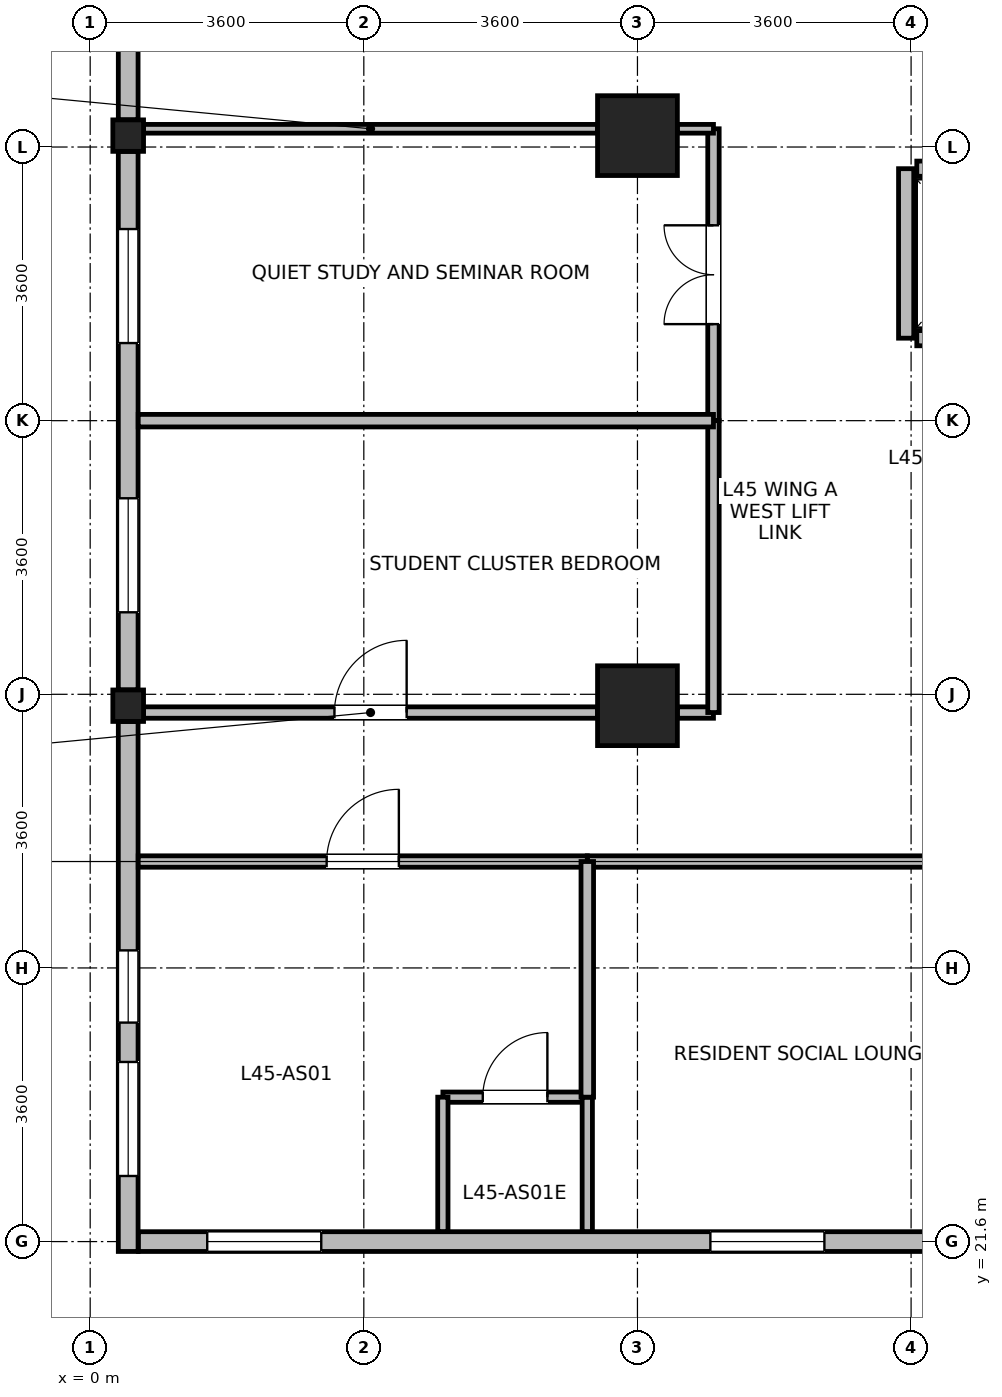
"""IFC4 building model, lengths in metres.
Left out: names, types, materials, properties, quantities, classifications, styles, units other than length and angle.
Written with IfcOpenShell. Run it as: python <this file> out.ifc"""

import sys

from ifc_helpers import new_model, si_unit, direction, frame, frame_2d, origin, origin_2d, place, context, subcontext, project, spatial, rectangle, i_section, extrude, source, transform, mapped, element, fill, save


model = new_model("IFC4")
c1 = context("Model", 3, precision=1e-05, world=origin(), true_north=direction((0.0, 1.0)))
c2 = subcontext(c1, "Body", "Model", "MODEL_VIEW")
j1 = project(units=[si_unit("LENGTHUNIT", "METRE"), si_unit("PLANEANGLEUNIT", "RADIAN")], contexts=[c1])
p1 = place(None, origin())
s1 = spatial("IfcSite", under=j1, at=p1, CompositionType="ELEMENT")
p2 = place(p1, origin())
s2 = spatial("IfcBuilding", under=s1, at=p2, CompositionType="ELEMENT")
p3 = place(p2, frame((0.0, 0.0, 177.2)))
s3 = spatial("IfcBuildingStorey", under=s2, at=p3, CompositionType="ELEMENT", Elevation=177.2)
m1 = source(origin(), c2, "Body", "SweptSolid", [
    extrude(rectangle(XDim=1.05, YDim=1.05, at=origin_2d()), origin(), (0.0, 0.0, 1.0), 3.7),
])
for number, where, z_axis, x_axis in (
    (1, (7.2, 28.65, 0.0), (0.0, 0.0, 1.0), (1.0, 0.0, 0.0)),
    (2, (7.2, 36.15, 0.0), (0.0, 0.0, 1.0), (1.0, 0.0, 0.0)),
):
    element("IfcColumn", number, at=place(p3, frame(where, z_axis=z_axis, x_axis=x_axis)), inside=s3, PredefinedType="COLUMN", context=c2, shape_type="MappedRepresentation", body=[
        mapped(m1, transform((0.0, 0.0, 0.0), x_axis=(1.0, 0.0, 0.0), y_axis=(0.0, 1.0, 0.0), z_axis=(0.0, 0.0, 1.0), scale=1.0)),
    ])
m2 = source(origin(), c2, "Body", "SweptSolid", [
    extrude(i_section(OverallWidth=0.404, OverallDepth=0.414, WebThickness=0.021, FlangeThickness=0.028, FilletRadius=0.015, at=origin_2d()), origin(), (0.0, 0.0, 1.0), 3.7),
])
for number, where, z_axis, x_axis in (
    (3, (0.5, 28.65, 0.0), (0.0, 0.0, 1.0), (1.0, 0.0, 0.0)),
    (4, (0.5, 36.15, 0.0), (0.0, 0.0, 1.0), (1.0, 0.0, 0.0)),
):
    element("IfcColumn", number, at=place(p3, frame(where, z_axis=z_axis, x_axis=x_axis)), inside=s3, PredefinedType="COLUMN", context=c2, shape_type="MappedRepresentation", body=[
        mapped(m2, transform((0.0, 0.0, 0.0), x_axis=(1.0, 0.0, 0.0), y_axis=(0.0, 1.0, 0.0), z_axis=(0.0, 0.0, 1.0), scale=1.0)),
    ])
p4 = place(p3, frame((0.5, 36.358, 0.0), z_axis=(0.0, 0.0, 1.0), x_axis=(0.0, 1.0, 0.0)))
e5 = element("IfcWall", 5, at=p4, inside=s3, PredefinedType="STANDARD", context=c2, shape_type="SweptSolid", body=[
    extrude(rectangle(XDim=3.372, YDim=0.26, at=frame_2d((1.686, 0.0))), origin(), (0.0, 0.0, 1.0), 3.44),
])
p5 = place(p4, frame((0.936, 0.0, 0.85)))
e6 = element("IfcOpeningElement", 6, at=p5, cuts=e5, PredefinedType="OPENING", context=c2, shape_type="SweptSolid", body=[
    extrude(rectangle(XDim=1.5, YDim=1.85, at=frame_2d((0.75, 0.925))), frame((0.0, 0.14, 0.0), z_axis=(0.0, -1.0, 0.0), x_axis=(1.0, 0.0, 0.0)), (0.0, 0.0, 1.0), 0.28),
])
p6 = place(p3, frame((0.5, 28.858, 0.0), z_axis=(0.0, 0.0, 1.0), x_axis=(0.0, 1.0, 0.0)))
e7 = element("IfcWall", 7, at=p6, inside=s3, PredefinedType="STANDARD", context=c2, shape_type="SweptSolid", body=[
    extrude(rectangle(XDim=7.084, YDim=0.26, at=frame_2d((3.542, 0.0))), origin(), (0.0, 0.0, 1.0), 2.99),
])
p7 = place(p6, frame((1.021, 0.0, 0.85)))
e8 = element("IfcOpeningElement", 8, at=p7, cuts=e7, PredefinedType="OPENING", context=c2, shape_type="SweptSolid", body=[
    extrude(rectangle(XDim=1.5, YDim=1.85, at=frame_2d((0.75, 0.925))), frame((0.0, 0.14, 0.0), z_axis=(0.0, -1.0, 0.0), x_axis=(1.0, 0.0, 0.0)), (0.0, 0.0, 1.0), 0.28),
])
p8 = place(p6, frame((4.563, 0.0, 0.85)))
e9 = element("IfcOpeningElement", 9, at=p8, cuts=e7, PredefinedType="OPENING", context=c2, shape_type="SweptSolid", body=[
    extrude(rectangle(XDim=1.5, YDim=1.85, at=frame_2d((0.75, 0.925))), frame((0.0, 0.14, 0.0), z_axis=(0.0, -1.0, 0.0), x_axis=(1.0, 0.0, 0.0)), (0.0, 0.0, 1.0), 0.28),
])
p9 = place(p3, frame((0.5, 21.47, 0.0), z_axis=(0.0, 0.0, 1.0), x_axis=(0.0, 1.0, 0.0)))
e10 = element("IfcWall", 10, at=p9, inside=s3, PredefinedType="STANDARD", context=c2, shape_type="SweptSolid", body=[
    extrude(rectangle(XDim=6.972, YDim=0.26, at=frame_2d((3.486, 0.0))), origin(), (0.0, 0.0, 1.0), 3.44),
])
p10 = place(p9, frame((0.993, 0.0, 0.85)))
e11 = element("IfcOpeningElement", 11, at=p10, cuts=e10, PredefinedType="OPENING", context=c2, shape_type="SweptSolid", body=[
    extrude(rectangle(XDim=1.5, YDim=1.85, at=frame_2d((0.75, 0.925))), frame((0.0, 0.14, 0.0), z_axis=(0.0, -1.0, 0.0), x_axis=(1.0, 0.0, 0.0)), (0.0, 0.0, 1.0), 0.28),
])
p11 = place(p9, frame((3.011, 0.0, 0.85)))
e12 = element("IfcOpeningElement", 12, at=p11, cuts=e10, PredefinedType="OPENING", context=c2, shape_type="SweptSolid", body=[
    extrude(rectangle(XDim=0.95, YDim=1.75, at=frame_2d((0.475, 0.875))), frame((0.0, 0.14, 0.0), z_axis=(0.0, -1.0, 0.0), x_axis=(1.0, 0.0, 0.0)), (0.0, 0.0, 1.0), 0.28),
])
p12 = place(p3, frame((13.874, 21.6, 0.0), z_axis=(0.0, 0.0, 1.0), x_axis=(-1.0, 0.0, 0.0)))
e13 = element("IfcWall", 13, at=p12, inside=s3, PredefinedType="STANDARD", context=c2, shape_type="SweptSolid", body=[
    extrude(rectangle(XDim=13.239, YDim=0.26, at=frame_2d((6.62, 0.0))), origin(), (0.0, 0.0, 1.0), 3.44),
])
p13 = place(p12, frame((0.905, 0.0, 0.85)))
e14 = element("IfcOpeningElement", 14, at=p13, cuts=e13, PredefinedType="OPENING", context=c2, shape_type="SweptSolid", body=[
    extrude(rectangle(XDim=1.5, YDim=1.85, at=frame_2d((0.75, 0.925))), frame((0.0, 0.14, 0.0), z_axis=(0.0, -1.0, 0.0), x_axis=(1.0, 0.0, 0.0)), (0.0, 0.0, 1.0), 0.28),
])
p14 = place(p12, frame((4.215, 0.0, 0.85)))
e15 = element("IfcOpeningElement", 15, at=p14, cuts=e13, PredefinedType="OPENING", context=c2, shape_type="SweptSolid", body=[
    extrude(rectangle(XDim=1.5, YDim=1.85, at=frame_2d((0.75, 0.925))), frame((0.0, 0.14, 0.0), z_axis=(0.0, -1.0, 0.0), x_axis=(1.0, 0.0, 0.0)), (0.0, 0.0, 1.0), 0.28),
])
p15 = place(p12, frame((10.834, 0.0, 0.85)))
e16 = element("IfcOpeningElement", 16, at=p15, cuts=e13, PredefinedType="OPENING", context=c2, shape_type="SweptSolid", body=[
    extrude(rectangle(XDim=1.5, YDim=1.85, at=frame_2d((0.75, 0.925))), frame((0.0, 0.14, 0.0), z_axis=(0.0, -1.0, 0.0), x_axis=(1.0, 0.0, 0.0)), (0.0, 0.0, 1.0), 0.28),
])
p16 = place(p3, frame((10.875, 33.485, 0.0), z_axis=(0.0, 0.0, 1.0), x_axis=(1.0, 0.0, 0.0)))
e17 = element("IfcWall", 17, at=p16, inside=s3, PredefinedType="PARTITIONING", context=c2, shape_type="SweptSolid", body=[
    extrude(rectangle(XDim=1.65, YDim=0.2, at=frame_2d((0.825, 0.0))), origin(), (0.0, 0.0, 1.0), 3.44),
])
p17 = place(p16, frame((0.275, 0.0, 0.0)))
e18 = element("IfcOpeningElement", 18, at=p17, cuts=e17, PredefinedType="OPENING", context=c2, shape_type="SweptSolid", body=[
    extrude(rectangle(XDim=1.1, YDim=2.12, at=frame_2d((0.55, 1.06))), frame((0.0, 0.11, 0.0), z_axis=(0.0, -1.0, 0.0), x_axis=(1.0, 0.0, 0.0)), (0.0, 0.0, 1.0), 0.22),
])
p18 = place(p3, frame((10.875, 35.715, 0.0), z_axis=(0.0, 0.0, 1.0), x_axis=(1.0, 0.0, 0.0)))
e19 = element("IfcWall", 19, at=p18, inside=s3, PredefinedType="PARTITIONING", context=c2, shape_type="SweptSolid", body=[
    extrude(rectangle(XDim=1.65, YDim=0.2, at=frame_2d((0.825, 0.0))), origin(), (0.0, 0.0, 1.0), 3.44),
])
p19 = place(p3, frame((10.735, 33.485, 0.0), z_axis=(0.0, 0.0, 1.0), x_axis=(0.0, 1.0, 0.0)))
e20 = element("IfcWall", 20, at=p19, inside=s3, PredefinedType="PARTITIONING", context=c2, shape_type="SweptSolid", body=[
    extrude(rectangle(XDim=2.23, YDim=0.2, at=frame_2d((1.115, 0.0))), origin(), (0.0, 0.0, 1.0), 3.44),
])
p20 = place(p3, frame((4.64, 23.5, 0.0), z_axis=(0.0, 0.0, 1.0), x_axis=(1.0, 0.0, 0.0)))
e21 = element("IfcWall", 21, at=p20, inside=s3, PredefinedType="PARTITIONING", context=c2, shape_type="SweptSolid", body=[
    extrude(rectangle(XDim=1.9, YDim=0.135, at=frame_2d((0.95, 0.0))), origin(), (0.0, 0.0, 1.0), 3.44),
])
p21 = place(p20, frame((0.525, 0.0, 0.0)))
e22 = element("IfcOpeningElement", 22, at=p21, cuts=e21, PredefinedType="OPENING", context=c2, shape_type="SweptSolid", body=[
    extrude(rectangle(XDim=0.85, YDim=2.04, at=frame_2d((0.425, 1.02))), frame((0.0, 0.078, 0.0), z_axis=(0.0, -1.0, 0.0), x_axis=(1.0, 0.0, 0.0)), (0.0, 0.0, 1.0), 0.155),
])
for number, where, z_axis, x_axis in (
    (23, (4.64, 21.732, 0.0), (0.0, 0.0, 1.0), (0.0, 1.0, 0.0)),
    (24, (6.54, 21.732, 0.0), (0.0, 0.0, 1.0), (0.0, 1.0, 0.0)),
):
    element("IfcWall", number, at=place(p3, frame(where, z_axis=z_axis, x_axis=x_axis)), inside=s3, PredefinedType="PARTITIONING", context=c2, shape_type="SweptSolid", body=[
        extrude(rectangle(XDim=1.768, YDim=0.135, at=frame_2d((0.884, 0.0))), origin(), (0.0, 0.0, 1.0), 3.44),
    ])
p22 = place(p3, frame((6.54, 26.6, 0.0), z_axis=(0.0, 0.0, 1.0), x_axis=(1.0, 0.0, 0.0)))
e25 = element("IfcWall", 25, at=p22, inside=s3, PredefinedType="PARTITIONING", context=c2, shape_type="SweptSolid", body=[
    extrude(rectangle(XDim=10.32, YDim=0.15, at=frame_2d((5.16, 0.0))), origin(), (0.0, 0.0, 1.0), 3.44),
])
p23 = place(p22, frame((4.51, 0.0, 0.0)))
e26 = element("IfcOpeningElement", 26, at=p23, cuts=e25, PredefinedType="OPENING", context=c2, shape_type="SweptSolid", body=[
    extrude(rectangle(XDim=1.3, YDim=2.12, at=frame_2d((0.65, 1.06))), frame((0.0, 0.085, 0.0), z_axis=(0.0, -1.0, 0.0), x_axis=(1.0, 0.0, 0.0)), (0.0, 0.0, 1.0), 0.17),
])
p24 = place(p3, frame((0.702, 28.56, 0.0), z_axis=(0.0, 0.0, 1.0), x_axis=(1.0, 0.0, 0.0)))
e27 = element("IfcWall", 27, at=p24, inside=s3, PredefinedType="PARTITIONING", context=c2, shape_type="SweptSolid", body=[
    extrude(rectangle(XDim=5.973, YDim=0.15, at=frame_2d((2.987, 0.0))), origin(), (0.0, 0.0, 1.0), 2.84),
])
p25 = place(p24, frame((2.511, 0.0, 0.0)))
e28 = element("IfcOpeningElement", 28, at=p25, cuts=e27, PredefinedType="OPENING", context=c2, shape_type="SweptSolid", body=[
    extrude(rectangle(XDim=0.95, YDim=2.1, at=frame_2d((0.475, 1.05))), frame((0.0, 0.085, 0.0), z_axis=(0.0, -1.0, 0.0), x_axis=(1.0, 0.0, 0.0)), (0.0, 0.0, 1.0), 0.17),
])
p26 = place(p3, frame((7.725, 28.56, 0.0), z_axis=(0.0, 0.0, 1.0), x_axis=(1.0, 0.0, 0.0)))
e29 = element("IfcWall", 29, at=p26, inside=s3, PredefinedType="PARTITIONING", context=c2, shape_type="SweptSolid", body=[
    extrude(rectangle(XDim=0.475, YDim=0.15, at=frame_2d((0.237, 0.0))), origin(), (0.0, 0.0, 1.0), 2.84),
])
p27 = place(p3, frame((0.632, 26.6, 0.0), z_axis=(0.0, 0.0, 1.0), x_axis=(1.0, 0.0, 0.0)))
e30 = element("IfcWall", 30, at=p27, inside=s3, PredefinedType="PARTITIONING", context=c2, shape_type="SweptSolid", body=[
    extrude(rectangle(XDim=5.908, YDim=0.15, at=frame_2d((2.954, 0.0))), origin(), (0.0, 0.0, 1.0), 3.44),
])
p28 = place(p27, frame((2.479, 0.0, 0.0)))
e31 = element("IfcOpeningElement", 31, at=p28, cuts=e30, PredefinedType="OPENING", context=c2, shape_type="SweptSolid", body=[
    extrude(rectangle(XDim=0.95, YDim=2.1, at=frame_2d((0.475, 1.05))), frame((0.0, 0.085, 0.0), z_axis=(0.0, -1.0, 0.0), x_axis=(1.0, 0.0, 0.0)), (0.0, 0.0, 1.0), 0.17),
])
p29 = place(p3, frame((8.2, 32.4, 0.0), z_axis=(0.0, 0.0, 1.0), x_axis=(0.0, 1.0, 0.0)))
e32 = element("IfcWall", 32, at=p29, inside=s3, PredefinedType="PARTITIONING", context=c2, shape_type="SweptSolid", body=[
    extrude(rectangle(XDim=3.84, YDim=0.15, at=frame_2d((1.92, 0.0))), origin(), (0.0, 0.0, 1.0), 3.44),
])
p30 = place(p29, frame((1.27, 0.0, 0.0)))
e33 = element("IfcOpeningElement", 33, at=p30, cuts=e32, PredefinedType="OPENING", context=c2, shape_type="SweptSolid", body=[
    extrude(rectangle(XDim=1.3, YDim=2.12, at=frame_2d((0.65, 1.06))), frame((0.0, 0.085, 0.0), z_axis=(0.0, -1.0, 0.0), x_axis=(1.0, 0.0, 0.0)), (0.0, 0.0, 1.0), 0.17),
])
p31 = place(p3, frame((8.2, 28.56, 0.0), z_axis=(0.0, 0.0, 1.0), x_axis=(0.0, 1.0, 0.0)))
e34 = element("IfcWall", 34, at=p31, inside=s3, PredefinedType="PARTITIONING", context=c2, shape_type="SweptSolid", body=[
    extrude(rectangle(XDim=3.84, YDim=0.15, at=frame_2d((1.92, 0.0))), origin(), (0.0, 0.0, 1.0), 3.44),
])
p32 = place(p3, frame((0.632, 32.4, 0.0), z_axis=(0.0, 0.0, 1.0), x_axis=(1.0, 0.0, 0.0)))
e35 = element("IfcWall", 35, at=p32, inside=s3, PredefinedType="PARTITIONING", context=c2, shape_type="SweptSolid", body=[
    extrude(rectangle(XDim=7.568, YDim=0.165, at=frame_2d((3.784, 0.0))), origin(), (0.0, 0.0, 1.0), 3.44),
])
p33 = place(p3, frame((0.702, 36.24, 0.0), z_axis=(0.0, 0.0, 1.0), x_axis=(1.0, 0.0, 0.0)))
e36 = element("IfcWall", 36, at=p33, inside=s3, PredefinedType="PARTITIONING", context=c2, shape_type="SweptSolid", body=[
    extrude(rectangle(XDim=5.973, YDim=0.115, at=frame_2d((2.987, 0.0))), origin(), (0.0, 0.0, 1.0), 2.84),
])
p34 = place(p3, frame((7.725, 36.24, 0.0), z_axis=(0.0, 0.0, 1.0), x_axis=(1.0, 0.0, 0.0)))
e37 = element("IfcWall", 37, at=p34, inside=s3, PredefinedType="PARTITIONING", context=c2, shape_type="SweptSolid", body=[
    extrude(rectangle(XDim=0.475, YDim=0.115, at=frame_2d((0.237, 0.0))), origin(), (0.0, 0.0, 1.0), 2.84),
])
p35 = place(p3, frame((6.54, 23.5, 0.0), z_axis=(0.0, 0.0, 1.0), x_axis=(0.0, 1.0, 0.0)))
e38 = element("IfcWall", 38, at=p35, inside=s3, PredefinedType="PARTITIONING", context=c2, shape_type="SweptSolid", body=[
    extrude(rectangle(XDim=3.1, YDim=0.165, at=frame_2d((1.55, 0.0))), origin(), (0.0, 0.0, 1.0), 3.44),
])
p36 = place(p7, origin())
e39 = element("IfcWindow", 39, at=p36, inside=s3, PartitioningType="SINGLE_PANEL", PredefinedType="WINDOW", context=c2, shape_type="SweptSolid", body=[
    extrude(rectangle(XDim=1.5, YDim=1.85, at=frame_2d((0.75, 0.925))), frame((0.0, 0.03, 0.0), z_axis=(0.0, -1.0, 0.0), x_axis=(1.0, 0.0, 0.0)), (0.0, 0.0, 1.0), 0.06),
])
fill(e8, e39)
p37 = place(p8, origin())
e40 = element("IfcWindow", 40, at=p37, inside=s3, PartitioningType="SINGLE_PANEL", PredefinedType="WINDOW", context=c2, shape_type="SweptSolid", body=[
    extrude(rectangle(XDim=1.5, YDim=1.85, at=frame_2d((0.75, 0.925))), frame((0.0, 0.03, 0.0), z_axis=(0.0, -1.0, 0.0), x_axis=(1.0, 0.0, 0.0)), (0.0, 0.0, 1.0), 0.06),
])
fill(e9, e40)
p38 = place(p10, origin())
e41 = element("IfcWindow", 41, at=p38, inside=s3, PartitioningType="SINGLE_PANEL", PredefinedType="WINDOW", context=c2, shape_type="SweptSolid", body=[
    extrude(rectangle(XDim=1.5, YDim=1.85, at=frame_2d((0.75, 0.925))), frame((0.0, 0.03, 0.0), z_axis=(0.0, -1.0, 0.0), x_axis=(1.0, 0.0, 0.0)), (0.0, 0.0, 1.0), 0.06),
])
fill(e11, e41)
p39 = place(p11, origin())
e42 = element("IfcWindow", 42, at=p39, inside=s3, PartitioningType="SINGLE_PANEL", PredefinedType="WINDOW", context=c2, shape_type="SweptSolid", body=[
    extrude(rectangle(XDim=0.95, YDim=1.75, at=frame_2d((0.475, 0.875))), frame((0.0, 0.03, 0.0), z_axis=(0.0, -1.0, 0.0), x_axis=(1.0, 0.0, 0.0)), (0.0, 0.0, 1.0), 0.06),
])
fill(e12, e42)
p40 = place(p14, origin())
e43 = element("IfcWindow", 43, at=p40, inside=s3, PartitioningType="SINGLE_PANEL", PredefinedType="WINDOW", context=c2, shape_type="SweptSolid", body=[
    extrude(rectangle(XDim=1.5, YDim=1.85, at=frame_2d((0.75, 0.925))), frame((0.0, 0.03, 0.0), z_axis=(0.0, -1.0, 0.0), x_axis=(1.0, 0.0, 0.0)), (0.0, 0.0, 1.0), 0.06),
])
fill(e15, e43)
p41 = place(p15, origin())
e44 = element("IfcWindow", 44, at=p41, inside=s3, PartitioningType="SINGLE_PANEL", PredefinedType="WINDOW", context=c2, shape_type="SweptSolid", body=[
    extrude(rectangle(XDim=1.5, YDim=1.85, at=frame_2d((0.75, 0.925))), frame((0.0, 0.03, 0.0), z_axis=(0.0, -1.0, 0.0), x_axis=(1.0, 0.0, 0.0)), (0.0, 0.0, 1.0), 0.06),
])
fill(e16, e44)
p42 = place(p21, origin())
e45 = element("IfcDoor", 45, at=p42, inside=s3, OperationType="SINGLE_SWING_RIGHT", PredefinedType="DOOR", context=c2, shape_type="SweptSolid", body=[
    extrude(rectangle(XDim=0.85, YDim=2.04, at=frame_2d((0.425, 1.02))), frame((0.0, 0.025, 0.0), z_axis=(0.0, -1.0, 0.0), x_axis=(1.0, 0.0, 0.0)), (0.0, 0.0, 1.0), 0.05),
])
fill(e22, e45)
p43 = place(p25, origin())
e46 = element("IfcDoor", 46, at=p43, inside=s3, OperationType="SINGLE_SWING_RIGHT", PredefinedType="DOOR", context=c2, shape_type="SweptSolid", body=[
    extrude(rectangle(XDim=0.95, YDim=2.1, at=frame_2d((0.475, 1.05))), frame((0.0, 0.025, 0.0), z_axis=(0.0, -1.0, 0.0), x_axis=(1.0, 0.0, 0.0)), (0.0, 0.0, 1.0), 0.05),
])
fill(e28, e46)
p44 = place(p28, origin())
e47 = element("IfcDoor", 47, at=p44, inside=s3, OperationType="SINGLE_SWING_RIGHT", PredefinedType="DOOR", context=c2, shape_type="SweptSolid", body=[
    extrude(rectangle(XDim=0.95, YDim=2.1, at=frame_2d((0.475, 1.05))), frame((0.0, 0.025, 0.0), z_axis=(0.0, -1.0, 0.0), x_axis=(1.0, 0.0, 0.0)), (0.0, 0.0, 1.0), 0.05),
])
fill(e31, e47)
p45 = place(p30, origin())
e48 = element("IfcDoor", 48, at=p45, inside=s3, OperationType="DOUBLE_DOOR_SINGLE_SWING", PredefinedType="DOOR", context=c2, shape_type="SweptSolid", body=[
    extrude(rectangle(XDim=1.3, YDim=2.12, at=frame_2d((0.65, 1.06))), frame((0.0, 0.025, 0.0), z_axis=(0.0, -1.0, 0.0), x_axis=(1.0, 0.0, 0.0)), (0.0, 0.0, 1.0), 0.05),
])
fill(e33, e48)
save(model, sys.argv[1])
